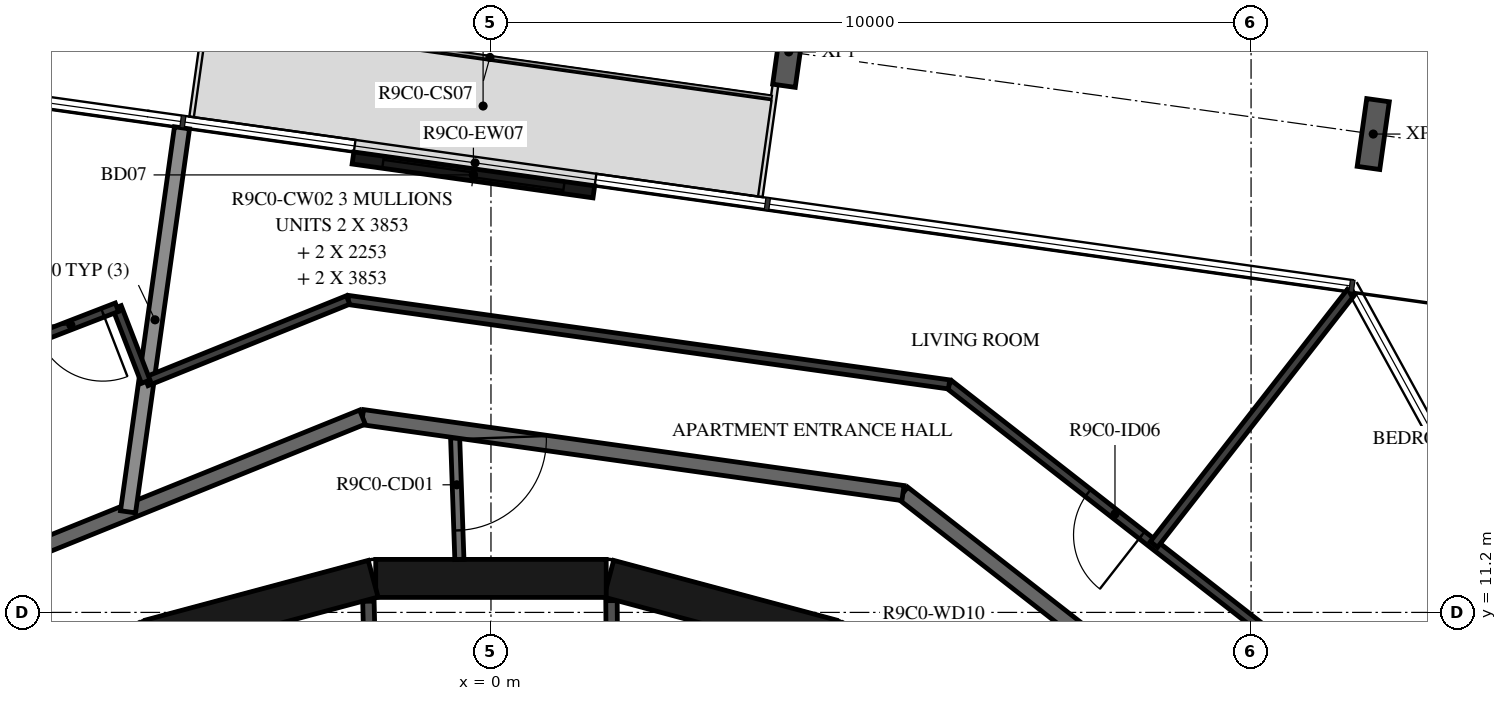
"""IFC4 building model, lengths in metres.
Left out: names, types, materials, properties, quantities, classifications, styles, units other than length and angle.
Written with IfcOpenShell. Run it as: python <this file> out.ifc"""

import sys

from ifc_helpers import new_model, si_unit, direction, frame, frame_2d, origin, origin_2d, place, context, subcontext, project, spatial, rectangle, i_section, extrude, element, fill, save


model = new_model("IFC4")
c1 = context("Model", 3, precision=1e-05, world=origin(), true_north=direction((0.0, 1.0)))
c2 = subcontext(c1, "Body", "Model", "MODEL_VIEW")
j1 = project(units=[si_unit("LENGTHUNIT", "METRE"), si_unit("PLANEANGLEUNIT", "RADIAN")], contexts=[c1])
p1 = place(None, origin())
s1 = spatial("IfcSite", under=j1, at=p1, CompositionType="ELEMENT")
p2 = place(p1, origin())
s2 = spatial("IfcBuilding", under=s1, at=p2, CompositionType="ELEMENT")
p3 = place(p2, frame((0.0, 0.0, 354.0)))
s3 = spatial("IfcBuildingStorey", under=s2, at=p3, CompositionType="ELEMENT", Elevation=354.0)
for number, where, z_axis, x_axis in (
    (1, (11.607, 17.493, -0.38), (0.0, 0.0, 1.0), (0.99, -0.139, 0.0)),
    (2, (3.917, 18.574, -0.38), (0.0, 0.0, 1.0), (0.99, -0.139, 0.0)),
):
    element("IfcColumn", number, at=place(p3, frame(where, z_axis=z_axis, x_axis=x_axis)), inside=s3, PredefinedType="COLUMN", context=c2, shape_type="SweptSolid", body=[
        extrude(i_section(OverallWidth=0.3, OverallDepth=0.9, WebThickness=0.019, FlangeThickness=0.035, FilletRadius=0.03, at=origin_2d()), origin(), (0.0, 0.0, 1.0), 3.5),
    ])
p4 = place(p3, frame((1.354, 16.733, 0.0), z_axis=(0.0, 0.0, 1.0), x_axis=(-0.990270382149, 0.139156639217, 0.0)))
e3 = element("IfcWall", 3, at=p4, inside=s3, PredefinedType="STANDARD", context=c2, shape_type="SweptSolid", body=[
    extrude(rectangle(XDim=3.2, YDim=0.16, at=frame_2d((1.6, 0.0))), origin(), (0.0, 0.0, 1.0), 3.12),
])
p5 = place(p4, frame((0.4, 0.0, 0.0)))
e4 = element("IfcOpeningElement", 4, at=p5, cuts=e3, PredefinedType="OPENING", context=c2, shape_type="SweptSolid", body=[
    extrude(rectangle(XDim=2.4, YDim=2.4, at=frame_2d((1.2, 1.2))), frame((0.0, 0.09, 0.0), z_axis=(0.0, -1.0, 0.0), x_axis=(1.0, 0.0, 0.0)), (0.0, 0.0, 1.0), 0.18),
])
for number, where, z_axis, x_axis in (
    (5, (4.479, 10.858, 0.0), (0.0, 0.0, 1.0), (-0.966, 0.259, 0.0)),
    (6, (1.516, 11.647, 0.0), (0.0, 0.0, 1.0), (-1.0, 0.0, 0.0)),
    (7, (-1.55, 11.643, 0.0), (0.0, 0.0, 1.0), (-0.966, -0.259, 0.0)),
):
    element("IfcWall", number, at=place(p3, frame(where, z_axis=z_axis, x_axis=x_axis)), inside=s3, PredefinedType="SHEAR", context=c2, shape_type="SweptSolid", body=[
        extrude(rectangle(XDim=3.033, YDim=0.5, at=frame_2d((1.516, 0.0))), origin(), (0.0, 0.0, 1.0), 3.12),
    ])
p6 = place(p3, frame((1.586, 11.354, 0.0), z_axis=(0.0, 0.0, 1.0), x_axis=(0.007227482881, -0.999973881405, 0.0)))
e8 = element("IfcWall", 8, at=p6, inside=s3, PredefinedType="PARTITIONING", context=c2, shape_type="SweptSolid", body=[
    extrude(rectangle(XDim=2.365, YDim=0.15, at=frame_2d((1.182, 0.0))), origin(), (0.0, 0.0, 1.0), 3.12),
])
p7 = place(p6, frame((0.732, 0.0, 0.0)))
e9 = element("IfcOpeningElement", 9, at=p7, cuts=e8, PredefinedType="OPENING", context=c2, shape_type="SweptSolid", body=[
    extrude(rectangle(XDim=0.9, YDim=2.1, at=frame_2d((0.45, 1.05))), frame((0.0, 0.085, 0.0), z_axis=(0.0, -1.0, 0.0), x_axis=(1.0, 0.0, 0.0)), (0.0, 0.0, 1.0), 0.17),
])
p8 = place(p3, frame((-1.555, 8.99, 0.0), z_axis=(0.0, 0.0, 1.0), x_axis=(-0.024125549686, 0.999708936567, 0.0)))
e10 = element("IfcWall", 10, at=p8, inside=s3, PredefinedType="PARTITIONING", context=c2, shape_type="SweptSolid", body=[
    extrude(rectangle(XDim=2.358, YDim=0.15, at=frame_2d((1.179, 0.0))), origin(), (0.0, 0.0, 1.0), 3.12),
])
p9 = place(p8, frame((0.729, 0.0, 0.0)))
e11 = element("IfcOpeningElement", 11, at=p9, cuts=e10, PredefinedType="OPENING", context=c2, shape_type="SweptSolid", body=[
    extrude(rectangle(XDim=0.9, YDim=2.1, at=frame_2d((0.45, 1.05))), frame((0.0, 0.085, 0.0), z_axis=(0.0, -1.0, 0.0), x_axis=(1.0, 0.0, 0.0)), (0.0, 0.0, 1.0), 0.17),
])
p10 = place(p3, frame((-0.475, 13.598, 0.0), z_axis=(0.0, 0.0, 1.0), x_axis=(0.034852521429, -0.999392466326, 0.0)))
e12 = element("IfcWall", 12, at=p10, inside=s3, PredefinedType="PARTITIONING", context=c2, shape_type="SweptSolid", body=[
    extrude(rectangle(XDim=1.702, YDim=0.12, at=frame_2d((0.851, 0.0))), origin(), (0.0, 0.0, 1.0), 3.12),
])
p11 = place(p10, frame((0.12, 0.0, 0.0)))
e13 = element("IfcOpeningElement", 13, at=p11, cuts=e12, PredefinedType="OPENING", context=c2, shape_type="SweptSolid", body=[
    extrude(rectangle(XDim=1.2, YDim=2.1, at=frame_2d((0.6, 1.05))), frame((0.0, 0.07, 0.0), z_axis=(0.0, -1.0, 0.0), x_axis=(1.0, 0.0, 0.0)), (0.0, 0.0, 1.0), 0.14),
])
p12 = place(p3, frame((11.079, 8.349, 0.0), z_axis=(0.0, 0.0, 1.0), x_axis=(-0.78800478687, 0.615669112324, 0.0)))
e14 = element("IfcWall", 14, at=p12, inside=s3, PredefinedType="STANDARD", context=c2, shape_type="SweptSolid", body=[
    extrude(rectangle(XDim=7.181, YDim=0.2, at=frame_2d((3.591, 0.0))), origin(), (0.0, 0.0, 1.0), 3.12),
])
p13 = place(p12, frame((1.0, 0.0, 0.0)))
e15 = element("IfcOpeningElement", 15, at=p13, cuts=e14, PredefinedType="OPENING", context=c2, shape_type="SweptSolid", body=[
    extrude(rectangle(XDim=1.0, YDim=2.1, at=frame_2d((0.5, 1.05))), frame((0.0, 0.11, 0.0), z_axis=(0.0, -1.0, 0.0), x_axis=(1.0, 0.0, 0.0)), (0.0, 0.0, 1.0), 0.22),
])
p14 = place(p3, frame((5.42, 12.77, 0.0), z_axis=(0.0, 0.0, 1.0), x_axis=(-0.990270565508, 0.139155334385, 0.0)))
e16 = element("IfcWall", 16, at=p14, inside=s3, PredefinedType="STANDARD", context=c2, shape_type="SweptSolid", body=[
    extrude(rectangle(XDim=7.181, YDim=0.2, at=frame_2d((3.59, 0.0))), origin(), (0.0, 0.0, 1.0), 3.12),
])
p15 = place(p3, frame((-1.691, 13.769, 0.0), z_axis=(0.0, 0.0, 1.0), x_axis=(-0.92717916932, -0.374618189599, 0.0)))
e17 = element("IfcWall", 17, at=p15, inside=s3, PredefinedType="STANDARD", context=c2, shape_type="SweptSolid", body=[
    extrude(rectangle(XDim=7.181, YDim=0.2, at=frame_2d((3.591, 0.0))), origin(), (0.0, 0.0, 1.0), 3.12),
])
p16 = place(p3, frame((-4.065, 17.575, 0.0), z_axis=(0.0, 0.0, 1.0), x_axis=(-0.139163175955, -0.990269463559, 0.0)))
e18 = element("IfcWall", 18, at=p16, inside=s3, PredefinedType="STANDARD", context=c2, shape_type="SweptSolid", body=[
    extrude(rectangle(XDim=5.102, YDim=0.2, at=frame_2d((2.551, 0.0))), origin(), (0.0, 0.0, 1.0), 2.73),
])
p17 = place(p3, frame((12.254, 9.334, 0.0), z_axis=(0.0, 0.0, 1.0), x_axis=(-0.787994393996, 0.615682414098, 0.0)))
e19 = element("IfcWall", 19, at=p17, inside=s3, PredefinedType="PARTITIONING", context=c2, shape_type="SweptSolid", body=[
    extrude(rectangle(XDim=7.902, YDim=0.12, at=frame_2d((3.951, 0.0))), origin(), (0.0, 0.0, 1.0), 3.12),
])
p18 = place(p17, frame((0.2, 0.0, 0.0)))
e20 = element("IfcOpeningElement", 20, at=p18, cuts=e19, PredefinedType="OPENING", context=c2, shape_type="SweptSolid", body=[
    extrude(rectangle(XDim=0.9, YDim=2.1, at=frame_2d((0.45, 1.05))), frame((0.0, 0.07, 0.0), z_axis=(0.0, -1.0, 0.0), x_axis=(1.0, 0.0, 0.0)), (0.0, 0.0, 1.0), 0.14),
])
p19 = place(p17, frame((4.683, 0.0, 0.0)))
e21 = element("IfcOpeningElement", 21, at=p19, cuts=e19, PredefinedType="OPENING", context=c2, shape_type="SweptSolid", body=[
    extrude(rectangle(XDim=0.9, YDim=2.1, at=frame_2d((0.45, 1.05))), frame((0.0, 0.07, 0.0), z_axis=(0.0, -1.0, 0.0), x_axis=(1.0, 0.0, 0.0)), (0.0, 0.0, 1.0), 0.14),
])
p20 = place(p3, frame((6.027, 14.199, 0.0), z_axis=(0.0, 0.0, 1.0), x_axis=(-0.990271593532, 0.139148018469, 0.0)))
e22 = element("IfcWall", 22, at=p20, inside=s3, PredefinedType="PARTITIONING", context=c2, shape_type="SweptSolid", body=[
    extrude(rectangle(XDim=7.985, YDim=0.12, at=frame_2d((3.992, 0.0))), origin(), (0.0, 0.0, 1.0), 3.12),
])
p21 = place(p3, frame((-1.88, 15.311, 0.0), z_axis=(0.0, 0.0, 1.0), x_axis=(-0.927176894493, -0.374623819743, 0.0)))
e23 = element("IfcWall", 23, at=p21, inside=s3, PredefinedType="PARTITIONING", context=c2, shape_type="SweptSolid", body=[
    extrude(rectangle(XDim=2.862, YDim=0.12, at=frame_2d((1.431, 0.0))), origin(), (0.0, 0.0, 1.0), 3.12),
])
p22 = place(p3, frame((11.315, 15.414, 0.0), z_axis=(0.0, 0.0, 1.0), x_axis=(-0.615656413137, -0.788014708596, 0.0)))
e24 = element("IfcWall", 24, at=p22, inside=s3, PredefinedType="PARTITIONING", context=c2, shape_type="SweptSolid", body=[
    extrude(rectangle(XDim=4.213, YDim=0.12, at=frame_2d((2.106, 0.0))), origin(), (0.0, 0.0, 1.0), 3.12),
])
p23 = place(p3, frame((-4.542, 14.235, 0.0), z_axis=(0.0, 0.0, 1.0), x_axis=(-0.360785401119, 0.932648859078, 0.0)))
e25 = element("IfcWall", 25, at=p23, inside=s3, PredefinedType="PARTITIONING", context=c2, shape_type="SweptSolid", body=[
    extrude(rectangle(XDim=1.05, YDim=0.12, at=frame_2d((0.525, 0.0))), origin(), (0.0, 0.0, 1.0), 3.12),
])
p24 = place(p3, frame((-4.921, 15.215, 0.0), z_axis=(0.0, 0.0, 1.0), x_axis=(-0.93265541153, -0.360768462236, 0.0)))
e26 = element("IfcWall", 26, at=p24, inside=s3, PredefinedType="PARTITIONING", context=c2, shape_type="SweptSolid", body=[
    extrude(rectangle(XDim=1.7, YDim=0.12, at=frame_2d((0.85, 0.0))), origin(), (0.0, 0.0, 1.0), 3.12),
])
p25 = place(p24, frame((0.2, 0.0, 0.0)))
e27 = element("IfcOpeningElement", 27, at=p25, cuts=e26, PredefinedType="OPENING", context=c2, shape_type="SweptSolid", body=[
    extrude(rectangle(XDim=0.9, YDim=2.1, at=frame_2d((0.45, 1.05))), frame((0.0, 0.07, 0.0), z_axis=(0.0, -1.0, 0.0), x_axis=(1.0, 0.0, 0.0)), (0.0, 0.0, 1.0), 0.14),
])
p26 = place(p5, origin())
e28 = element("IfcDoor", 28, at=p26, inside=s3, OperationType="DOUBLE_DOOR_SLIDING", PredefinedType="DOOR", context=c2, shape_type="SweptSolid", body=[
    extrude(rectangle(XDim=2.4, YDim=2.4, at=frame_2d((1.2, 1.2))), frame((0.0, 0.025, 0.0), z_axis=(0.0, -1.0, 0.0), x_axis=(1.0, 0.0, 0.0)), (0.0, 0.0, 1.0), 0.05),
])
fill(e4, e28)
p27 = place(p19, origin())
e29 = element("IfcDoor", 29, at=p27, inside=s3, OperationType="SINGLE_SWING_LEFT", PredefinedType="DOOR", context=c2, shape_type="SweptSolid", body=[
    extrude(rectangle(XDim=0.9, YDim=2.1, at=frame_2d((0.45, 1.05))), frame((0.0, 0.025, 0.0), z_axis=(0.0, -1.0, 0.0), x_axis=(1.0, 0.0, 0.0)), (0.0, 0.0, 1.0), 0.05),
])
fill(e21, e29)
p28 = place(p25, origin())
e30 = element("IfcDoor", 30, at=p28, inside=s3, OperationType="SINGLE_SWING_RIGHT", PredefinedType="DOOR", context=c2, shape_type="SweptSolid", body=[
    extrude(rectangle(XDim=0.9, YDim=2.1, at=frame_2d((0.45, 1.05))), frame((0.0, 0.025, 0.0), z_axis=(0.0, -1.0, 0.0), x_axis=(1.0, 0.0, 0.0)), (0.0, 0.0, 1.0), 0.05),
])
fill(e27, e30)
p29 = place(p11, origin())
e31 = element("IfcDoor", 31, at=p29, inside=s3, OperationType="DOUBLE_DOOR_SINGLE_SWING", PredefinedType="DOOR", context=c2, shape_type="SweptSolid", body=[
    extrude(rectangle(XDim=1.2, YDim=2.1, at=frame_2d((0.6, 1.05))), frame((0.0, 0.025, 0.0), z_axis=(0.0, -1.0, 0.0), x_axis=(1.0, 0.0, 0.0)), (0.0, 0.0, 1.0), 0.05),
])
fill(e13, e31)
save(model, sys.argv[1])
